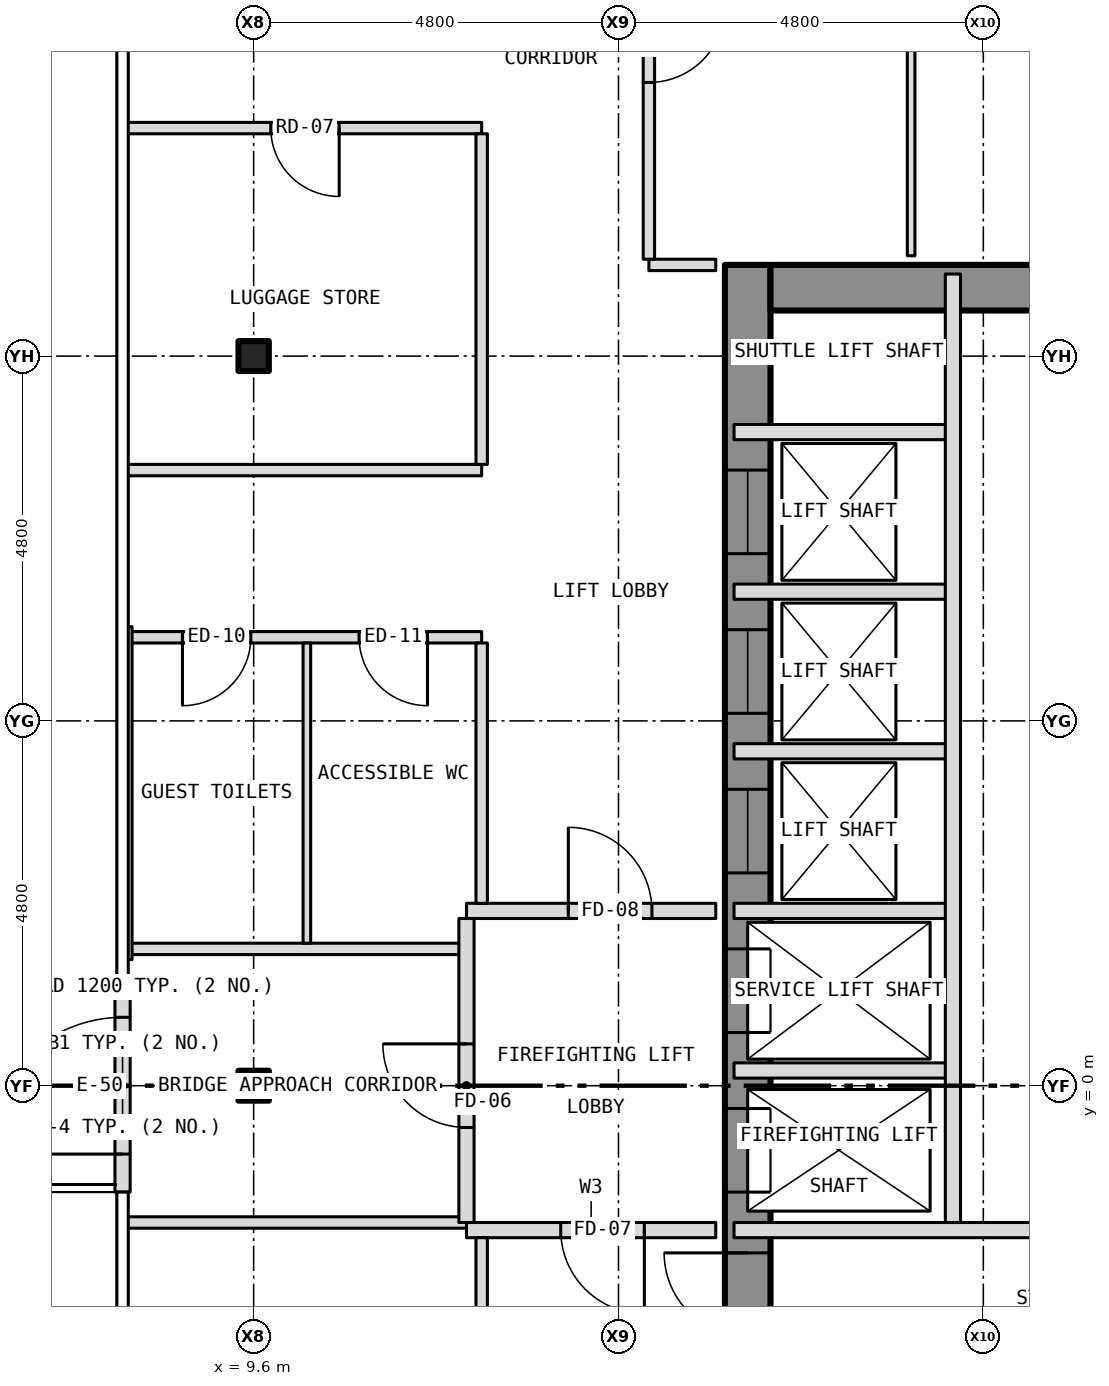
"""IFC4 building model, lengths in metres.
Left out: names, types, materials, properties, quantities, classifications, styles, units other than length and angle.
Written with IfcOpenShell. Run it as: python <this file> out.ifc"""

import sys

from ifc_helpers import new_model, si_unit, direction, frame, frame_2d, origin, origin_2d, place, context, subcontext, project, spatial, rectangle, i_section, extrude, element, fill, save


model = new_model("IFC4")
c1 = context("Model", 3, precision=1e-05, world=origin(), true_north=direction((0.0, 1.0)))
c2 = subcontext(c1, "Body", "Model", "MODEL_VIEW")
j1 = project(units=[si_unit("LENGTHUNIT", "METRE"), si_unit("PLANEANGLEUNIT", "RADIAN")], contexts=[c1])
p1 = place(None, origin())
s1 = spatial("IfcSite", under=j1, at=p1, CompositionType="ELEMENT")
p2 = place(p1, origin())
s2 = spatial("IfcBuilding", under=s1, at=p2, CompositionType="ELEMENT")
p3 = place(p2, frame((0.0, 0.0, 127.5)))
s3 = spatial("IfcBuildingStorey", under=s2, at=p3, CompositionType="ELEMENT", Elevation=127.5)
for number, where, z_axis, x_axis in (
    (1, (9.6, 0.0, -0.15), (0.0, 0.0, 1.0), (1.0, 0.0, 0.0)),
    (2, (9.6, 9.6, -0.15), (0.0, 0.0, 1.0), (1.0, 0.0, 0.0)),
):
    element("IfcColumn", number, at=place(p3, frame(where, z_axis=z_axis, x_axis=x_axis)), inside=s3, PredefinedType="COLUMN", context=c2, shape_type="SweptSolid", body=[
        extrude(i_section(OverallWidth=0.399, OverallDepth=0.394, WebThickness=0.023, FlangeThickness=0.037, at=origin_2d()), origin(), (0.0, 0.0, 1.0), 3.5),
    ])
p4 = place(p3, frame((16.1, -10.8, 0.0), z_axis=(0.0, 0.0, 1.0), x_axis=(0.0, 1.0, 0.0)))
e3 = element("IfcWall", 3, at=p4, inside=s3, PredefinedType="SHEAR", context=c2, shape_type="SweptSolid", body=[
    extrude(rectangle(XDim=21.6, YDim=0.6, at=frame_2d((10.8, 0.0))), origin(), (0.0, 0.0, 1.0), 3.25),
])
p5 = place(p4, frame((9.4, 0.0, 0.0)))
e4 = element("IfcOpeningElement", 4, at=p5, cuts=e3, PredefinedType="OPENING", context=c2, shape_type="SweptSolid", body=[
    extrude(rectangle(XDim=1.1, YDim=2.1, at=frame_2d((0.55, 1.05))), frame((0.0, 0.312, 0.0), z_axis=(0.0, -1.0, 0.0), x_axis=(1.0, 0.0, 0.0)), (0.0, 0.0, 1.0), 0.624),
])
p6 = place(p4, frame((11.5, 0.0, 0.0)))
e5 = element("IfcOpeningElement", 5, at=p6, cuts=e3, PredefinedType="OPENING", context=c2, shape_type="SweptSolid", body=[
    extrude(rectangle(XDim=1.1, YDim=2.1, at=frame_2d((0.55, 1.05))), frame((0.0, 0.312, 0.0), z_axis=(0.0, -1.0, 0.0), x_axis=(1.0, 0.0, 0.0)), (0.0, 0.0, 1.0), 0.624),
])
p7 = place(p4, frame((13.6, 0.0, 0.0)))
e6 = element("IfcOpeningElement", 6, at=p7, cuts=e3, PredefinedType="OPENING", context=c2, shape_type="SweptSolid", body=[
    extrude(rectangle(XDim=1.1, YDim=2.1, at=frame_2d((0.55, 1.05))), frame((0.0, 0.312, 0.0), z_axis=(0.0, -1.0, 0.0), x_axis=(1.0, 0.0, 0.0)), (0.0, 0.0, 1.0), 0.624),
])
p8 = place(p4, frame((15.7, 0.0, 0.0)))
e7 = element("IfcOpeningElement", 7, at=p8, cuts=e3, PredefinedType="OPENING", context=c2, shape_type="SweptSolid", body=[
    extrude(rectangle(XDim=1.1, YDim=2.1, at=frame_2d((0.55, 1.05))), frame((0.0, 0.312, 0.0), z_axis=(0.0, -1.0, 0.0), x_axis=(1.0, 0.0, 0.0)), (0.0, 0.0, 1.0), 0.624),
])
p9 = place(p4, frame((17.8, 0.0, 0.0)))
e8 = element("IfcOpeningElement", 8, at=p9, cuts=e3, PredefinedType="OPENING", context=c2, shape_type="SweptSolid", body=[
    extrude(rectangle(XDim=1.1, YDim=2.1, at=frame_2d((0.55, 1.05))), frame((0.0, 0.312, 0.0), z_axis=(0.0, -1.0, 0.0), x_axis=(1.0, 0.0, 0.0)), (0.0, 0.0, 1.0), 0.624),
])
p10 = place(p4, frame((5.642, 0.0, 0.0)))
e9 = element("IfcOpeningElement", 9, at=p10, cuts=e3, PredefinedType="OPENING", context=c2, shape_type="SweptSolid", body=[
    extrude(rectangle(XDim=1.1, YDim=2.1, at=frame_2d((0.55, 1.05))), frame((0.0, 0.312, 0.0), z_axis=(0.0, -1.0, 0.0), x_axis=(1.0, 0.0, 0.0)), (0.0, 0.0, 1.0), 0.624),
])
p11 = place(p4, frame((7.5, 0.0, 0.0)))
e10 = element("IfcOpeningElement", 10, at=p11, cuts=e3, PredefinedType="OPENING", context=c2, shape_type="SweptSolid", body=[
    extrude(rectangle(XDim=1.1, YDim=2.1, at=frame_2d((0.55, 1.05))), frame((0.0, 0.312, 0.0), z_axis=(0.0, -1.0, 0.0), x_axis=(1.0, 0.0, 0.0)), (0.0, 0.0, 1.0), 0.624),
])
p12 = place(p3, frame((16.4, 10.5, 0.0), z_axis=(0.0, 0.0, 1.0), x_axis=(1.0, 0.0, 0.0)))
e11 = element("IfcWall", 11, at=p12, inside=s3, PredefinedType="SHEAR", context=c2, shape_type="SweptSolid", body=[
    extrude(rectangle(XDim=5.8, YDim=0.6, at=frame_2d((2.9, 0.0))), origin(), (0.0, 0.0, 1.0), 3.25),
])
p13 = place(p3, frame((7.875, -1.4, 0.0), z_axis=(0.0, 0.0, 1.0), x_axis=(0.0, 1.0, 0.0)))
e12 = element("IfcWall", 12, at=p13, inside=s3, PredefinedType="SOLIDWALL", context=c2, shape_type="SweptSolid", body=[
    extrude(rectangle(XDim=2.8, YDim=0.2, at=frame_2d((1.4, 0.0))), origin(), (0.0, 0.0, 1.0), 3.5),
])
p14 = place(p13, frame((0.5, 0.0, 0.0)))
e13 = element("IfcOpeningElement", 13, at=p14, cuts=e12, PredefinedType="OPENING", context=c2, shape_type="SweptSolid", body=[
    extrude(rectangle(XDim=1.8, YDim=2.1, at=frame_2d((0.9, 1.05))), frame((0.0, 0.112, 0.0), z_axis=(0.0, -1.0, 0.0), x_axis=(1.0, 0.0, 0.0)), (0.0, 0.0, 1.0), 0.224),
])
p15 = place(p3, frame((12.4, -1.9, 0.0), z_axis=(0.0, 0.0, 1.0), x_axis=(1.0, 0.0, 0.0)))
e14 = element("IfcWall", 14, at=p15, inside=s3, PredefinedType="PARTITIONING", context=c2, shape_type="SweptSolid", body=[
    extrude(rectangle(XDim=3.28, YDim=0.2, at=frame_2d((1.64, 0.0))), origin(), (0.0, 0.0, 1.0), 3.35),
])
p16 = place(p15, frame((1.24, 0.0, 0.0)))
e15 = element("IfcOpeningElement", 15, at=p16, cuts=e14, PredefinedType="OPENING", context=c2, shape_type="SweptSolid", body=[
    extrude(rectangle(XDim=1.1, YDim=2.1, at=frame_2d((0.55, 1.05))), frame((0.0, 0.112, 0.0), z_axis=(0.0, -1.0, 0.0), x_axis=(1.0, 0.0, 0.0)), (0.0, 0.0, 1.0), 0.224),
])
p17 = place(p3, frame((15.92, -1.9, 0.0), z_axis=(0.0, 0.0, 1.0), x_axis=(1.0, 0.0, 0.0)))
e16 = element("IfcWall", 16, at=p17, inside=s3, PredefinedType="PARTITIONING", context=c2, shape_type="SweptSolid", body=[
    extrude(rectangle(XDim=6.76, YDim=0.2, at=frame_2d((3.38, 0.0))), origin(), (0.0, 0.0, 1.0), 3.25),
])
p18 = place(p3, frame((7.92, -1.8, 0.0), z_axis=(0.0, 0.0, 1.0), x_axis=(1.0, 0.0, 0.0)))
e17 = element("IfcWall", 17, at=p18, inside=s3, PredefinedType="PARTITIONING", context=c2, shape_type="SweptSolid", body=[
    extrude(rectangle(XDim=4.48, YDim=0.15, at=frame_2d((2.24, 0.0))), origin(), (0.0, 0.0, 1.0), 3.35),
])
p19 = place(p3, frame((15.92, 0.2, 0.0), z_axis=(0.0, 0.0, 1.0), x_axis=(1.0, 0.0, 0.0)))
e18 = element("IfcWall", 18, at=p19, inside=s3, PredefinedType="PARTITIONING", context=c2, shape_type="SweptSolid", body=[
    extrude(rectangle(XDim=2.88, YDim=0.2, at=frame_2d((1.44, 0.0))), origin(), (0.0, 0.0, 1.0), 3.25),
])
p20 = place(p3, frame((7.95, 1.8, 0.0), z_axis=(0.0, 0.0, 1.0), x_axis=(1.0, 0.0, 0.0)))
e19 = element("IfcWall", 19, at=p20, inside=s3, PredefinedType="PARTITIONING", context=c2, shape_type="SweptSolid", body=[
    extrude(rectangle(XDim=4.45, YDim=0.15, at=frame_2d((2.225, 0.0))), origin(), (0.0, 0.0, 1.0), 3.35),
])
p21 = place(p3, frame((12.4, 2.3, 0.0), z_axis=(0.0, 0.0, 1.0), x_axis=(1.0, 0.0, 0.0)))
e20 = element("IfcWall", 20, at=p21, inside=s3, PredefinedType="PARTITIONING", context=c2, shape_type="SweptSolid", body=[
    extrude(rectangle(XDim=3.28, YDim=0.2, at=frame_2d((1.64, 0.0))), origin(), (0.0, 0.0, 1.0), 3.35),
])
p22 = place(p21, frame((1.34, 0.0, 0.0)))
e21 = element("IfcOpeningElement", 21, at=p22, cuts=e20, PredefinedType="OPENING", context=c2, shape_type="SweptSolid", body=[
    extrude(rectangle(XDim=1.1, YDim=2.1, at=frame_2d((0.55, 1.05))), frame((0.0, 0.112, 0.0), z_axis=(0.0, -1.0, 0.0), x_axis=(1.0, 0.0, 0.0)), (0.0, 0.0, 1.0), 0.224),
])
for number, where, z_axis, x_axis in (
    (22, (15.92, 2.3, 0.0), (0.0, 0.0, 1.0), (1.0, 0.0, 0.0)),
    (23, (15.92, 4.4, 0.0), (0.0, 0.0, 1.0), (1.0, 0.0, 0.0)),
):
    element("IfcWall", number, at=place(p3, frame(where, z_axis=z_axis, x_axis=x_axis)), inside=s3, PredefinedType="PARTITIONING", context=c2, shape_type="SweptSolid", body=[
        extrude(rectangle(XDim=2.88, YDim=0.2, at=frame_2d((1.44, 0.0))), origin(), (0.0, 0.0, 1.0), 3.25),
    ])
p23 = place(p3, frame((7.95, 5.9, 0.0), z_axis=(0.0, 0.0, 1.0), x_axis=(1.0, 0.0, 0.0)))
e24 = element("IfcWall", 24, at=p23, inside=s3, PredefinedType="PARTITIONING", context=c2, shape_type="SweptSolid", body=[
    extrude(rectangle(XDim=4.65, YDim=0.15, at=frame_2d((2.325, 0.0))), origin(), (0.0, 0.0, 1.0), 3.35),
])
p24 = place(p23, frame((0.713, 0.0, 0.0)))
e25 = element("IfcOpeningElement", 25, at=p24, cuts=e24, PredefinedType="OPENING", context=c2, shape_type="SweptSolid", body=[
    extrude(rectangle(XDim=0.9, YDim=2.1, at=frame_2d((0.45, 1.05))), frame((0.0, 0.087, 0.0), z_axis=(0.0, -1.0, 0.0), x_axis=(1.0, 0.0, 0.0)), (0.0, 0.0, 1.0), 0.174),
])
p25 = place(p23, frame((3.037, 0.0, 0.0)))
e26 = element("IfcOpeningElement", 26, at=p25, cuts=e24, PredefinedType="OPENING", context=c2, shape_type="SweptSolid", body=[
    extrude(rectangle(XDim=0.9, YDim=2.1, at=frame_2d((0.45, 1.05))), frame((0.0, 0.087, 0.0), z_axis=(0.0, -1.0, 0.0), x_axis=(1.0, 0.0, 0.0)), (0.0, 0.0, 1.0), 0.174),
])
p26 = place(p3, frame((15.92, 6.5, 0.0), z_axis=(0.0, 0.0, 1.0), x_axis=(1.0, 0.0, 0.0)))
e27 = element("IfcWall", 27, at=p26, inside=s3, PredefinedType="PARTITIONING", context=c2, shape_type="SweptSolid", body=[
    extrude(rectangle(XDim=2.88, YDim=0.2, at=frame_2d((1.44, 0.0))), origin(), (0.0, 0.0, 1.0), 3.25),
])
p27 = place(p3, frame((7.92, 8.1, 0.0), z_axis=(0.0, 0.0, 1.0), x_axis=(1.0, 0.0, 0.0)))
e28 = element("IfcWall", 28, at=p27, inside=s3, PredefinedType="PARTITIONING", context=c2, shape_type="SweptSolid", body=[
    extrude(rectangle(XDim=4.68, YDim=0.15, at=frame_2d((2.34, 0.0))), origin(), (0.0, 0.0, 1.0), 3.35),
])
p28 = place(p3, frame((15.92, 8.6, 0.0), z_axis=(0.0, 0.0, 1.0), x_axis=(1.0, 0.0, 0.0)))
e29 = element("IfcWall", 29, at=p28, inside=s3, PredefinedType="PARTITIONING", context=c2, shape_type="SweptSolid", body=[
    extrude(rectangle(XDim=2.88, YDim=0.2, at=frame_2d((1.44, 0.0))), origin(), (0.0, 0.0, 1.0), 3.25),
])
p29 = place(p3, frame((14.8, 10.8, 0.0), z_axis=(0.0, 0.0, 1.0), x_axis=(1.0, 0.0, 0.0)))
e30 = element("IfcWall", 30, at=p29, inside=s3, PredefinedType="PARTITIONING", context=c2, shape_type="SweptSolid", body=[
    extrude(rectangle(XDim=0.88, YDim=0.15, at=frame_2d((0.44, 0.0))), origin(), (0.0, 0.0, 1.0), 3.35),
])
p30 = place(p3, frame((7.92, 12.6, 0.0), z_axis=(0.0, 0.0, 1.0), x_axis=(1.0, 0.0, 0.0)))
e31 = element("IfcWall", 31, at=p30, inside=s3, PredefinedType="PARTITIONING", context=c2, shape_type="SweptSolid", body=[
    extrude(rectangle(XDim=4.68, YDim=0.15, at=frame_2d((2.34, 0.0))), origin(), (0.0, 0.0, 1.0), 3.35),
])
p31 = place(p30, frame((1.905, 0.0, 0.0)))
e32 = element("IfcOpeningElement", 32, at=p31, cuts=e31, PredefinedType="OPENING", context=c2, shape_type="SweptSolid", body=[
    extrude(rectangle(XDim=0.9, YDim=2.1, at=frame_2d((0.45, 1.05))), frame((0.0, 0.087, 0.0), z_axis=(0.0, -1.0, 0.0), x_axis=(1.0, 0.0, 0.0)), (0.0, 0.0, 1.0), 0.174),
])
p32 = place(p3, frame((7.95, 1.66, 0.0), z_axis=(0.0, 0.0, 1.0), x_axis=(0.0, 1.0, 0.0)))
e33 = element("IfcWall", 33, at=p32, inside=s3, PredefinedType="PARTITIONING", context=c2, shape_type="SweptSolid", body=[
    extrude(rectangle(XDim=4.38, YDim=0.1, at=frame_2d((2.19, 0.0))), origin(), (0.0, 0.0, 1.0), 2.733),
])
p33 = place(p3, frame((10.3, 1.875, 0.0), z_axis=(0.0, 0.0, 1.0), x_axis=(0.0, 1.0, 0.0)))
e34 = element("IfcWall", 34, at=p33, inside=s3, PredefinedType="PARTITIONING", context=c2, shape_type="SweptSolid", body=[
    extrude(rectangle(XDim=3.95, YDim=0.1, at=frame_2d((1.975, 0.0))), origin(), (0.0, 0.0, 1.0), 3.35),
])
p34 = place(p3, frame((12.4, -1.8, 0.0), z_axis=(0.0, 0.0, 1.0), x_axis=(0.0, 1.0, 0.0)))
e35 = element("IfcWall", 35, at=p34, inside=s3, PredefinedType="PARTITIONING", context=c2, shape_type="SweptSolid", body=[
    extrude(rectangle(XDim=4.0, YDim=0.2, at=frame_2d((2.0, 0.0))), origin(), (0.0, 0.0, 1.0), 3.35),
])
p35 = place(p34, frame((1.25, 0.0, 0.0)))
e36 = element("IfcOpeningElement", 36, at=p35, cuts=e35, PredefinedType="OPENING", context=c2, shape_type="SweptSolid", body=[
    extrude(rectangle(XDim=1.1, YDim=2.1, at=frame_2d((0.55, 1.05))), frame((0.0, 0.112, 0.0), z_axis=(0.0, -1.0, 0.0), x_axis=(1.0, 0.0, 0.0)), (0.0, 0.0, 1.0), 0.224),
])
p36 = place(p3, frame((12.6, -12.525, 0.0), z_axis=(0.0, 0.0, 1.0), x_axis=(0.0, 1.0, 0.0)))
e37 = element("IfcWall", 37, at=p36, inside=s3, PredefinedType="PARTITIONING", context=c2, shape_type="SweptSolid", body=[
    extrude(rectangle(XDim=10.525, YDim=0.15, at=frame_2d((5.262, 0.0))), origin(), (0.0, 0.0, 1.0), 3.35),
])
p37 = place(p36, frame((4.825, 0.0, 0.0)))
e38 = element("IfcOpeningElement", 38, at=p37, cuts=e37, PredefinedType="OPENING", context=c2, shape_type="SweptSolid", body=[
    extrude(rectangle(XDim=0.9, YDim=2.1, at=frame_2d((0.45, 1.05))), frame((0.0, 0.087, 0.0), z_axis=(0.0, -1.0, 0.0), x_axis=(1.0, 0.0, 0.0)), (0.0, 0.0, 1.0), 0.174),
])
p38 = place(p3, frame((12.6, 2.4, 0.0), z_axis=(0.0, 0.0, 1.0), x_axis=(0.0, 1.0, 0.0)))
e39 = element("IfcWall", 39, at=p38, inside=s3, PredefinedType="PARTITIONING", context=c2, shape_type="SweptSolid", body=[
    extrude(rectangle(XDim=3.425, YDim=0.15, at=frame_2d((1.712, 0.0))), origin(), (0.0, 0.0, 1.0), 3.35),
])
p39 = place(p3, frame((12.6, 8.175, 0.0), z_axis=(0.0, 0.0, 1.0), x_axis=(0.0, 1.0, 0.0)))
e40 = element("IfcWall", 40, at=p39, inside=s3, PredefinedType="PARTITIONING", context=c2, shape_type="SweptSolid", body=[
    extrude(rectangle(XDim=4.35, YDim=0.15, at=frame_2d((2.175, 0.0))), origin(), (0.0, 0.0, 1.0), 3.35),
])
p40 = place(p3, frame((14.8, 10.875, 0.0), z_axis=(0.0, 0.0, 1.0), x_axis=(0.0, 1.0, 0.0)))
e41 = element("IfcWall", 41, at=p40, inside=s3, PredefinedType="PARTITIONING", context=c2, shape_type="SweptSolid", body=[
    extrude(rectangle(XDim=3.85, YDim=0.15, at=frame_2d((1.925, 0.0))), origin(), (0.0, 0.0, 1.0), 3.35),
])
p41 = place(p40, frame((2.325, 0.0, 0.0)))
e42 = element("IfcOpeningElement", 42, at=p41, cuts=e41, PredefinedType="OPENING", context=c2, shape_type="SweptSolid", body=[
    extrude(rectangle(XDim=1.0, YDim=2.1, at=frame_2d((0.5, 1.05))), frame((0.0, 0.087, 0.0), z_axis=(0.0, -1.0, 0.0), x_axis=(1.0, 0.0, 0.0)), (0.0, 0.0, 1.0), 0.174),
])
p42 = place(p3, frame((18.25, 10.92, 0.0), z_axis=(0.0, 0.0, 1.0), x_axis=(0.0, 1.0, 0.0)))
e43 = element("IfcWall", 43, at=p42, inside=s3, PredefinedType="PARTITIONING", context=c2, shape_type="SweptSolid", body=[
    extrude(rectangle(XDim=7.271, YDim=0.1, at=frame_2d((3.635, 0.0))), origin(), (0.0, 0.0, 1.0), 3.35),
])
p43 = place(p42, frame((5.43, 0.0, 0.0)))
e44 = element("IfcOpeningElement", 44, at=p43, cuts=e43, PredefinedType="OPENING", context=c2, shape_type="SweptSolid", body=[
    extrude(rectangle(XDim=0.9, YDim=2.1, at=frame_2d((0.45, 1.05))), frame((0.0, 0.062, 0.0), z_axis=(0.0, -1.0, 0.0), x_axis=(1.0, 0.0, 0.0)), (0.0, 0.0, 1.0), 0.124),
])
p44 = place(p3, frame((18.8, -1.8, 0.0), z_axis=(0.0, 0.0, 1.0), x_axis=(0.0, 1.0, 0.0)))
e45 = element("IfcWall", 45, at=p44, inside=s3, PredefinedType="PARTITIONING", context=c2, shape_type="SweptSolid", body=[
    extrude(rectangle(XDim=12.48, YDim=0.2, at=frame_2d((6.24, 0.0))), origin(), (0.0, 0.0, 1.0), 3.25),
])
p45 = place(p14, origin())
e46 = element("IfcDoor", 46, at=p45, inside=s3, OperationType="DOUBLE_DOOR_DOUBLE_SWING", PredefinedType="DOOR", context=c2, shape_type="SweptSolid", body=[
    extrude(rectangle(XDim=1.8, YDim=2.1, at=frame_2d((0.9, 1.05))), frame((0.0, 0.025, 0.0), z_axis=(0.0, -1.0, 0.0), x_axis=(1.0, 0.0, 0.0)), (0.0, 0.0, 1.0), 0.05),
])
fill(e13, e46)
p46 = place(p5, origin())
e47 = element("IfcDoor", 47, at=p46, inside=s3, OperationType="SLIDING_TO_LEFT", PredefinedType="DOOR", context=c2, shape_type="SweptSolid", body=[
    extrude(rectangle(XDim=1.1, YDim=2.1, at=frame_2d((0.55, 1.05))), frame((0.0, 0.025, 0.0), z_axis=(0.0, -1.0, 0.0), x_axis=(1.0, 0.0, 0.0)), (0.0, 0.0, 1.0), 0.05),
])
fill(e4, e47)
p47 = place(p6, origin())
e48 = element("IfcDoor", 48, at=p47, inside=s3, OperationType="SLIDING_TO_LEFT", PredefinedType="DOOR", context=c2, shape_type="SweptSolid", body=[
    extrude(rectangle(XDim=1.1, YDim=2.1, at=frame_2d((0.55, 1.05))), frame((0.0, 0.025, 0.0), z_axis=(0.0, -1.0, 0.0), x_axis=(1.0, 0.0, 0.0)), (0.0, 0.0, 1.0), 0.05),
])
fill(e5, e48)
p48 = place(p7, origin())
e49 = element("IfcDoor", 49, at=p48, inside=s3, OperationType="SLIDING_TO_LEFT", PredefinedType="DOOR", context=c2, shape_type="SweptSolid", body=[
    extrude(rectangle(XDim=1.1, YDim=2.1, at=frame_2d((0.55, 1.05))), frame((0.0, 0.025, 0.0), z_axis=(0.0, -1.0, 0.0), x_axis=(1.0, 0.0, 0.0)), (0.0, 0.0, 1.0), 0.05),
])
fill(e6, e49)
p49 = place(p8, origin())
e50 = element("IfcDoor", 50, at=p49, inside=s3, OperationType="SLIDING_TO_LEFT", PredefinedType="DOOR", context=c2, shape_type="SweptSolid", body=[
    extrude(rectangle(XDim=1.1, YDim=2.1, at=frame_2d((0.55, 1.05))), frame((0.0, 0.025, 0.0), z_axis=(0.0, -1.0, 0.0), x_axis=(1.0, 0.0, 0.0)), (0.0, 0.0, 1.0), 0.05),
])
fill(e7, e50)
p50 = place(p9, origin())
e51 = element("IfcDoor", 51, at=p50, inside=s3, OperationType="SLIDING_TO_LEFT", PredefinedType="DOOR", context=c2, shape_type="SweptSolid", body=[
    extrude(rectangle(XDim=1.1, YDim=2.1, at=frame_2d((0.55, 1.05))), frame((0.0, 0.025, 0.0), z_axis=(0.0, -1.0, 0.0), x_axis=(1.0, 0.0, 0.0)), (0.0, 0.0, 1.0), 0.05),
])
fill(e8, e51)
p51 = place(p11, origin())
e52 = element("IfcDoor", 52, at=p51, inside=s3, OperationType="SINGLE_SWING_RIGHT", PredefinedType="DOOR", context=c2, shape_type="SweptSolid", body=[
    extrude(rectangle(XDim=1.1, YDim=2.1, at=frame_2d((0.55, 1.05))), frame((0.0, 0.025, 0.0), z_axis=(0.0, -1.0, 0.0), x_axis=(1.0, 0.0, 0.0)), (0.0, 0.0, 1.0), 0.05),
])
fill(e10, e52)
p52 = place(p35, origin())
e53 = element("IfcDoor", 53, at=p52, inside=s3, OperationType="SINGLE_SWING_RIGHT", PredefinedType="DOOR", context=c2, shape_type="SweptSolid", body=[
    extrude(rectangle(XDim=1.1, YDim=2.1, at=frame_2d((0.55, 1.05))), frame((0.0, 0.025, 0.0), z_axis=(0.0, -1.0, 0.0), x_axis=(1.0, 0.0, 0.0)), (0.0, 0.0, 1.0), 0.05),
])
fill(e36, e53)
p53 = place(p16, origin())
e54 = element("IfcDoor", 54, at=p53, inside=s3, OperationType="SINGLE_SWING_RIGHT", PredefinedType="DOOR", context=c2, shape_type="SweptSolid", body=[
    extrude(rectangle(XDim=1.1, YDim=2.1, at=frame_2d((0.55, 1.05))), frame((0.0, 0.025, 0.0), z_axis=(0.0, -1.0, 0.0), x_axis=(1.0, 0.0, 0.0)), (0.0, 0.0, 1.0), 0.05),
])
fill(e15, e54)
p54 = place(p22, origin())
e55 = element("IfcDoor", 55, at=p54, inside=s3, OperationType="SINGLE_SWING_LEFT", PredefinedType="DOOR", context=c2, shape_type="SweptSolid", body=[
    extrude(rectangle(XDim=1.1, YDim=2.1, at=frame_2d((0.55, 1.05))), frame((0.0, 0.025, 0.0), z_axis=(0.0, -1.0, 0.0), x_axis=(1.0, 0.0, 0.0)), (0.0, 0.0, 1.0), 0.05),
])
fill(e21, e55)
p55 = place(p41, origin())
e56 = element("IfcDoor", 56, at=p55, inside=s3, OperationType="SINGLE_SWING_RIGHT", PredefinedType="DOOR", context=c2, shape_type="SweptSolid", body=[
    extrude(rectangle(XDim=1.0, YDim=2.1, at=frame_2d((0.5, 1.05))), frame((0.0, 0.025, 0.0), z_axis=(0.0, -1.0, 0.0), x_axis=(1.0, 0.0, 0.0)), (0.0, 0.0, 1.0), 0.05),
])
fill(e42, e56)
p56 = place(p24, origin())
e57 = element("IfcDoor", 57, at=p56, inside=s3, OperationType="SINGLE_SWING_LEFT", PredefinedType="DOOR", context=c2, shape_type="SweptSolid", body=[
    extrude(rectangle(XDim=0.9, YDim=2.1, at=frame_2d((0.45, 1.05))), frame((0.0, 0.025, 0.0), z_axis=(0.0, -1.0, 0.0), x_axis=(1.0, 0.0, 0.0)), (0.0, 0.0, 1.0), 0.05),
])
fill(e25, e57)
p57 = place(p25, origin())
e58 = element("IfcDoor", 58, at=p57, inside=s3, OperationType="SINGLE_SWING_RIGHT", PredefinedType="DOOR", context=c2, shape_type="SweptSolid", body=[
    extrude(rectangle(XDim=0.9, YDim=2.1, at=frame_2d((0.45, 1.05))), frame((0.0, 0.025, 0.0), z_axis=(0.0, -1.0, 0.0), x_axis=(1.0, 0.0, 0.0)), (0.0, 0.0, 1.0), 0.05),
])
fill(e26, e58)
p58 = place(p31, origin())
e59 = element("IfcDoor", 59, at=p58, inside=s3, OperationType="SINGLE_SWING_RIGHT", PredefinedType="DOOR", context=c2, shape_type="SweptSolid", body=[
    extrude(rectangle(XDim=0.9, YDim=2.1, at=frame_2d((0.45, 1.05))), frame((0.0, 0.025, 0.0), z_axis=(0.0, -1.0, 0.0), x_axis=(1.0, 0.0, 0.0)), (0.0, 0.0, 1.0), 0.05),
])
fill(e32, e59)
save(model, sys.argv[1])
